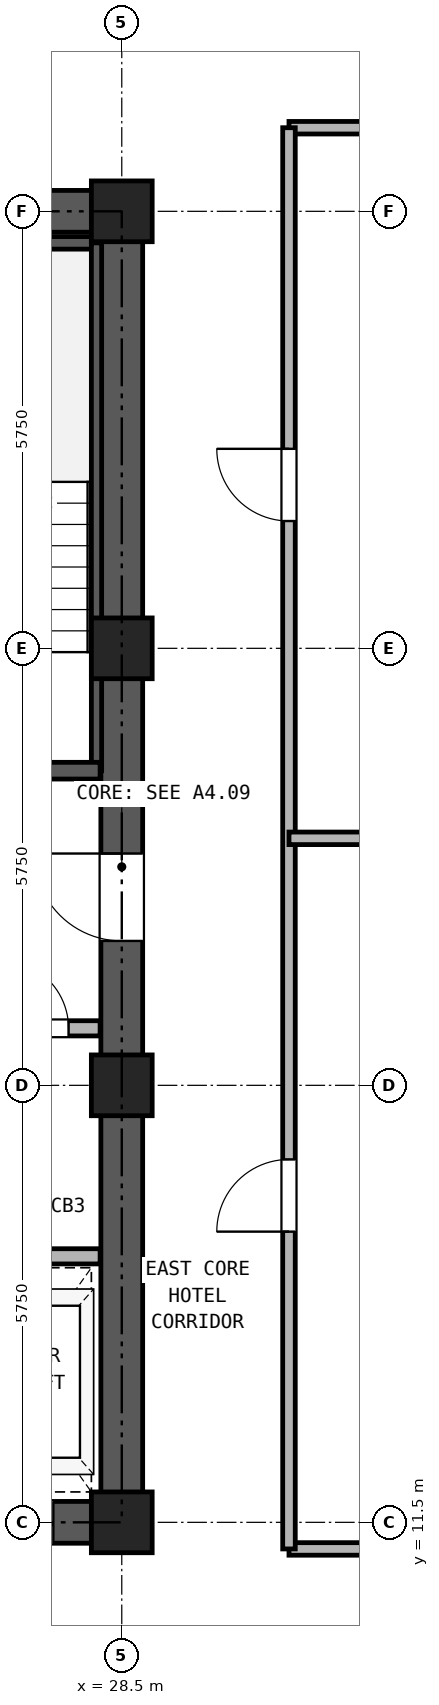
"""IFC4 building model, lengths in metres.
Left out: names, types, materials, properties, quantities, classifications, styles, units other than length and angle.
Written with IfcOpenShell. Run it as: python <this file> out.ifc"""

import sys

from ifc_helpers import new_model, si_unit, direction, frame, frame_2d, origin, origin_2d, place, context, subcontext, project, spatial, rectangle, hollow_rectangle, extrude, source, transform, mapped, element, fill, save


model = new_model("IFC4")
c1 = context("Model", 3, precision=1e-05, world=origin(), true_north=direction((0.0, 1.0)))
c2 = subcontext(c1, "Body", "Model", "MODEL_VIEW")
j1 = project(units=[si_unit("LENGTHUNIT", "METRE"), si_unit("PLANEANGLEUNIT", "RADIAN")], contexts=[c1])
p1 = place(None, origin())
s1 = spatial("IfcSite", under=j1, at=p1, CompositionType="ELEMENT")
p2 = place(p1, origin())
s2 = spatial("IfcBuilding", under=s1, at=p2, CompositionType="ELEMENT")
p3 = place(p2, frame((0.0, 0.0, 131.1)))
s3 = spatial("IfcBuildingStorey", under=s2, at=p3, CompositionType="ELEMENT", Elevation=131.1)
m1 = source(origin(), c2, "Body", "SweptSolid", [
    extrude(hollow_rectangle(XDim=0.8, YDim=0.8, WallThickness=0.045, at=origin_2d()), origin(), (0.0, 0.0, 1.0), 2.95),
])
for number, where, z_axis, x_axis in (
    (1, (28.5, 11.5, 0.0), (0.0, 0.0, 1.0), (1.0, 0.0, 0.0)),
    (2, (28.5, 17.25, 0.0), (0.0, 0.0, 1.0), (1.0, 0.0, 0.0)),
    (3, (28.5, 23.0, 0.0), (0.0, 0.0, 1.0), (1.0, 0.0, 0.0)),
    (4, (28.5, 28.75, 0.0), (0.0, 0.0, 1.0), (1.0, 0.0, 0.0)),
):
    element("IfcColumn", number, at=place(p3, frame(where, z_axis=z_axis, x_axis=x_axis)), inside=s3, PredefinedType="COLUMN", context=c2, shape_type="MappedRepresentation", body=[
        mapped(m1, transform((0.0, 0.0, 0.0), x_axis=(1.0, 0.0, 0.0), y_axis=(0.0, 1.0, 0.0), z_axis=(0.0, 0.0, 1.0), scale=1.0)),
    ])
p4 = place(p3, frame((18.225, 11.5, 0.0), z_axis=(0.0, 0.0, 1.0), x_axis=(1.0, 0.0, 0.0)))
e5 = element("IfcWall", 5, at=p4, inside=s3, PredefinedType="SHEAR", context=c2, shape_type="SweptSolid", body=[
    extrude(rectangle(XDim=10.55, YDim=0.55, at=frame_2d((5.275, 0.0))), origin(), (0.0, 0.0, 1.0), 2.95),
])
p5 = place(p4, frame((2.375, 0.0, 0.0)))
e6 = element("IfcOpeningElement", 6, at=p5, cuts=e5, PredefinedType="OPENING", context=c2, shape_type="SweptSolid", body=[
    extrude(rectangle(XDim=0.95, YDim=2.15, at=frame_2d((0.475, 1.075))), frame((0.0, 0.285, 0.0), z_axis=(0.0, -1.0, 0.0), x_axis=(1.0, 0.0, 0.0)), (0.0, 0.0, 1.0), 0.57),
])
p6 = place(p4, frame((5.875, 0.0, 0.0)))
e7 = element("IfcOpeningElement", 7, at=p6, cuts=e5, PredefinedType="OPENING", context=c2, shape_type="SweptSolid", body=[
    extrude(rectangle(XDim=1.1, YDim=2.25, at=frame_2d((0.55, 1.125))), frame((0.0, 0.285, 0.0), z_axis=(0.0, -1.0, 0.0), x_axis=(1.0, 0.0, 0.0)), (0.0, 0.0, 1.0), 0.57),
])
p7 = place(p4, frame((8.275, 0.0, 0.0)))
e8 = element("IfcOpeningElement", 8, at=p7, cuts=e5, PredefinedType="OPENING", context=c2, shape_type="SweptSolid", body=[
    extrude(rectangle(XDim=1.1, YDim=2.25, at=frame_2d((0.55, 1.125))), frame((0.0, 0.285, 0.0), z_axis=(0.0, -1.0, 0.0), x_axis=(1.0, 0.0, 0.0)), (0.0, 0.0, 1.0), 0.57),
])
p8 = place(p3, frame((18.225, 28.75, 0.0), z_axis=(0.0, 0.0, 1.0), x_axis=(1.0, 0.0, 0.0)))
e9 = element("IfcWall", 9, at=p8, inside=s3, PredefinedType="SHEAR", context=c2, shape_type="SweptSolid", body=[
    extrude(rectangle(XDim=10.55, YDim=0.55, at=frame_2d((5.275, 0.0))), origin(), (0.0, 0.0, 1.0), 2.95),
])
p9 = place(p8, frame((4.155, 0.0, 0.0)))
e10 = element("IfcOpeningElement", 10, at=p9, cuts=e9, PredefinedType="OPENING", context=c2, shape_type="SweptSolid", body=[
    extrude(rectangle(XDim=0.9, YDim=2.05, at=frame_2d((0.45, 1.025))), frame((0.0, 0.285, 0.0), z_axis=(0.0, -1.0, 0.0), x_axis=(1.0, 0.0, 0.0)), (0.0, 0.0, 1.0), 0.57),
])
p10 = place(p8, frame((5.695, 0.0, 0.0)))
e11 = element("IfcOpeningElement", 11, at=p10, cuts=e9, PredefinedType="OPENING", context=c2, shape_type="SweptSolid", body=[
    extrude(rectangle(XDim=0.9, YDim=2.05, at=frame_2d((0.45, 1.025))), frame((0.0, 0.285, 0.0), z_axis=(0.0, -1.0, 0.0), x_axis=(1.0, 0.0, 0.0)), (0.0, 0.0, 1.0), 0.57),
])
p11 = place(p3, frame((28.5, 11.775, 0.0), z_axis=(0.0, 0.0, 1.0), x_axis=(0.0, 1.0, 0.0)))
e12 = element("IfcWall", 12, at=p11, inside=s3, PredefinedType="SHEAR", context=c2, shape_type="SweptSolid", body=[
    extrude(rectangle(XDim=16.7, YDim=0.55, at=frame_2d((8.35, 0.0))), origin(), (0.0, 0.0, 1.0), 2.95),
])
p12 = place(p11, frame((7.375, 0.0, 0.0)))
e13 = element("IfcOpeningElement", 13, at=p12, cuts=e12, PredefinedType="OPENING", context=c2, shape_type="SweptSolid", body=[
    extrude(rectangle(XDim=1.15, YDim=2.2, at=frame_2d((0.575, 1.1))), frame((0.0, 0.285, 0.0), z_axis=(0.0, -1.0, 0.0), x_axis=(1.0, 0.0, 0.0)), (0.0, 0.0, 1.0), 0.57),
])
p13 = place(p3, frame((25.13, 28.335, 0.0), z_axis=(0.0, 0.0, 1.0), x_axis=(1.0, 0.0, 0.0)))
e14 = element("IfcWall", 14, at=p13, inside=s3, PredefinedType="PARTITIONING", context=c2, shape_type="SweptSolid", body=[
    extrude(rectangle(XDim=3.085, YDim=0.165, at=frame_2d((1.542, 0.0))), origin(), (0.0, 0.0, 1.0), 2.95),
])
p14 = place(p3, frame((28.167, 21.39, 0.0), z_axis=(0.0, 0.0, 1.0), x_axis=(0.0, 1.0, 0.0)))
e15 = element("IfcWall", 15, at=p14, inside=s3, PredefinedType="PARTITIONING", context=c2, shape_type="SweptSolid", body=[
    extrude(rectangle(XDim=6.945, YDim=0.135, at=frame_2d((3.473, 0.0))), origin(), (0.0, 0.0, 1.0), 2.95),
])
p15 = place(p3, frame((25.13, 21.39, 0.0), z_axis=(0.0, 0.0, 1.0), x_axis=(1.0, 0.0, 0.0)))
e16 = element("IfcWall", 16, at=p15, inside=s3, PredefinedType="SOLIDWALL", context=c2, shape_type="SweptSolid", body=[
    extrude(rectangle(XDim=3.085, YDim=0.22, at=frame_2d((1.542, 0.0))), origin(), (0.0, 0.0, 1.0), 2.95),
])
p16 = place(p15, frame((0.92, 0.0, 0.0)))
e17 = element("IfcOpeningElement", 17, at=p16, cuts=e16, PredefinedType="OPENING", context=c2, shape_type="SweptSolid", body=[
    extrude(rectangle(XDim=1.15, YDim=2.2, at=frame_2d((0.575, 1.1))), frame((0.0, 0.12, 0.0), z_axis=(0.0, -1.0, 0.0), x_axis=(1.0, 0.0, 0.0)), (0.0, 0.0, 1.0), 0.24),
])
p17 = place(p3, frame((18.785, 18.0, 0.0), z_axis=(0.0, 0.0, 1.0), x_axis=(1.0, 0.0, 0.0)))
e18 = element("IfcWall", 18, at=p17, inside=s3, PredefinedType="PARTITIONING", context=c2, shape_type="SweptSolid", body=[
    extrude(rectangle(XDim=9.43, YDim=0.2, at=frame_2d((4.715, 0.0))), origin(), (0.0, 0.0, 1.0), 2.95),
])
p18 = place(p17, frame((0.465, 0.0, 0.0)))
e19 = element("IfcOpeningElement", 19, at=p18, cuts=e18, PredefinedType="OPENING", context=c2, shape_type="SweptSolid", body=[
    extrude(rectangle(XDim=1.3, YDim=2.3, at=frame_2d((0.65, 1.15))), frame((0.0, 0.11, 0.0), z_axis=(0.0, -1.0, 0.0), x_axis=(1.0, 0.0, 0.0)), (0.0, 0.0, 1.0), 0.22),
])
p19 = place(p17, frame((2.565, 0.0, 0.0)))
e20 = element("IfcOpeningElement", 20, at=p19, cuts=e18, PredefinedType="OPENING", context=c2, shape_type="SweptSolid", body=[
    extrude(rectangle(XDim=1.3, YDim=2.3, at=frame_2d((0.65, 1.15))), frame((0.0, 0.11, 0.0), z_axis=(0.0, -1.0, 0.0), x_axis=(1.0, 0.0, 0.0)), (0.0, 0.0, 1.0), 0.22),
])
p20 = place(p17, frame((4.985, 0.0, 0.0)))
e21 = element("IfcOpeningElement", 21, at=p20, cuts=e18, PredefinedType="OPENING", context=c2, shape_type="SweptSolid", body=[
    extrude(rectangle(XDim=0.9, YDim=2.05, at=frame_2d((0.45, 1.025))), frame((0.0, 0.11, 0.0), z_axis=(0.0, -1.0, 0.0), x_axis=(1.0, 0.0, 0.0)), (0.0, 0.0, 1.0), 0.22),
])
p21 = place(p17, frame((8.115, 0.0, 0.0)))
e22 = element("IfcOpeningElement", 22, at=p21, cuts=e18, PredefinedType="OPENING", context=c2, shape_type="SweptSolid", body=[
    extrude(rectangle(XDim=0.9, YDim=2.05, at=frame_2d((0.45, 1.025))), frame((0.0, 0.11, 0.0), z_axis=(0.0, -1.0, 0.0), x_axis=(1.0, 0.0, 0.0)), (0.0, 0.0, 1.0), 0.22),
])
p22 = place(p3, frame((18.785, 15.0, 0.0), z_axis=(0.0, 0.0, 1.0), x_axis=(1.0, 0.0, 0.0)))
e23 = element("IfcWall", 23, at=p22, inside=s3, PredefinedType="PARTITIONING", context=c2, shape_type="SweptSolid", body=[
    extrude(rectangle(XDim=9.43, YDim=0.2, at=frame_2d((4.715, 0.0))), origin(), (0.0, 0.0, 1.0), 2.95),
])
for number, where, z_axis, x_axis in (
    (24, (30.7, 11.15, 0.0), (0.0, 0.0, 1.0), (1.0, 0.0, 0.0)),
    (25, (30.7, 29.85, 0.0), (0.0, 0.0, 1.0), (1.0, 0.0, 0.0)),
):
    element("IfcWall", number, at=place(p3, frame(where, z_axis=z_axis, x_axis=x_axis)), inside=s3, PredefinedType="PARTITIONING", context=c2, shape_type="SweptSolid", body=[
        extrude(rectangle(XDim=9.7, YDim=0.165, at=frame_2d((4.85, 0.0))), origin(), (0.0, 0.0, 1.0), 2.95),
    ])
p23 = place(p3, frame((30.7, 11.15, 0.0), z_axis=(0.0, 0.0, 1.0), x_axis=(0.0, 1.0, 0.0)))
e26 = element("IfcWall", 26, at=p23, inside=s3, PredefinedType="PARTITIONING", context=c2, shape_type="SweptSolid", body=[
    extrude(rectangle(XDim=18.7, YDim=0.165, at=frame_2d((9.35, 0.0))), origin(), (0.0, 0.0, 1.0), 2.95),
])
p24 = place(p23, frame((4.175, 0.0, 0.0)))
e27 = element("IfcOpeningElement", 27, at=p24, cuts=e26, PredefinedType="OPENING", context=c2, shape_type="SweptSolid", body=[
    extrude(rectangle(XDim=0.95, YDim=2.15, at=frame_2d((0.475, 1.075))), frame((0.0, 0.093, 0.0), z_axis=(0.0, -1.0, 0.0), x_axis=(1.0, 0.0, 0.0)), (0.0, 0.0, 1.0), 0.185),
])
p25 = place(p23, frame((13.525, 0.0, 0.0)))
e28 = element("IfcOpeningElement", 28, at=p25, cuts=e26, PredefinedType="OPENING", context=c2, shape_type="SweptSolid", body=[
    extrude(rectangle(XDim=0.95, YDim=2.15, at=frame_2d((0.475, 1.075))), frame((0.0, 0.093, 0.0), z_axis=(0.0, -1.0, 0.0), x_axis=(1.0, 0.0, 0.0)), (0.0, 0.0, 1.0), 0.185),
])
p26 = place(p3, frame((30.7, 20.5, 0.0), z_axis=(0.0, 0.0, 1.0), x_axis=(1.0, 0.0, 0.0)))
e29 = element("IfcWall", 29, at=p26, inside=s3, PredefinedType="PARTITIONING", context=c2, shape_type="SweptSolid", body=[
    extrude(rectangle(XDim=16.14, YDim=0.165, at=frame_2d((8.07, 0.0))), origin(), (0.0, 0.0, 1.0), 2.95),
])
p27 = place(p21, frame((0.9, 0.0, 0.0), z_axis=(0.0, 0.0, 1.0), x_axis=(-1.0, 0.0, 0.0)))
e30 = element("IfcDoor", 30, at=p27, inside=s3, OperationType="SINGLE_SWING_LEFT", PredefinedType="DOOR", context=c2, shape_type="SweptSolid", body=[
    extrude(rectangle(XDim=0.9, YDim=2.05, at=frame_2d((0.45, 1.025))), frame((0.0, 0.025, 0.0), z_axis=(0.0, -1.0, 0.0), x_axis=(1.0, 0.0, 0.0)), (0.0, 0.0, 1.0), 0.05),
])
fill(e22, e30)
p28 = place(p12, origin())
e31 = element("IfcDoor", 31, at=p28, inside=s3, OperationType="SINGLE_SWING_RIGHT", PredefinedType="DOOR", context=c2, shape_type="SweptSolid", body=[
    extrude(rectangle(XDim=1.15, YDim=2.2, at=frame_2d((0.575, 1.1))), frame((0.0, 0.025, 0.0), z_axis=(0.0, -1.0, 0.0), x_axis=(1.0, 0.0, 0.0)), (0.0, 0.0, 1.0), 0.05),
])
fill(e13, e31)
p29 = place(p7, frame((1.1, 0.0, 0.0), z_axis=(0.0, 0.0, 1.0), x_axis=(-1.0, 0.0, 0.0)))
e32 = element("IfcDoor", 32, at=p29, inside=s3, OperationType="DOUBLE_DOOR_SLIDING", PredefinedType="DOOR", context=c2, shape_type="SweptSolid", body=[
    extrude(rectangle(XDim=1.1, YDim=2.25, at=frame_2d((0.55, 1.125))), frame((0.0, 0.025, 0.0), z_axis=(0.0, -1.0, 0.0), x_axis=(1.0, 0.0, 0.0)), (0.0, 0.0, 1.0), 0.05),
])
fill(e8, e32)
p30 = place(p24, origin())
e33 = element("IfcDoor", 33, at=p30, inside=s3, OperationType="SINGLE_SWING_LEFT", PredefinedType="DOOR", context=c2, shape_type="SweptSolid", body=[
    extrude(rectangle(XDim=0.95, YDim=2.15, at=frame_2d((0.475, 1.075))), frame((0.0, 0.025, 0.0), z_axis=(0.0, -1.0, 0.0), x_axis=(1.0, 0.0, 0.0)), (0.0, 0.0, 1.0), 0.05),
])
fill(e27, e33)
p31 = place(p25, origin())
e34 = element("IfcDoor", 34, at=p31, inside=s3, OperationType="SINGLE_SWING_RIGHT", PredefinedType="DOOR", context=c2, shape_type="SweptSolid", body=[
    extrude(rectangle(XDim=0.95, YDim=2.15, at=frame_2d((0.475, 1.075))), frame((0.0, 0.025, 0.0), z_axis=(0.0, -1.0, 0.0), x_axis=(1.0, 0.0, 0.0)), (0.0, 0.0, 1.0), 0.05),
])
fill(e28, e34)
save(model, sys.argv[1])
